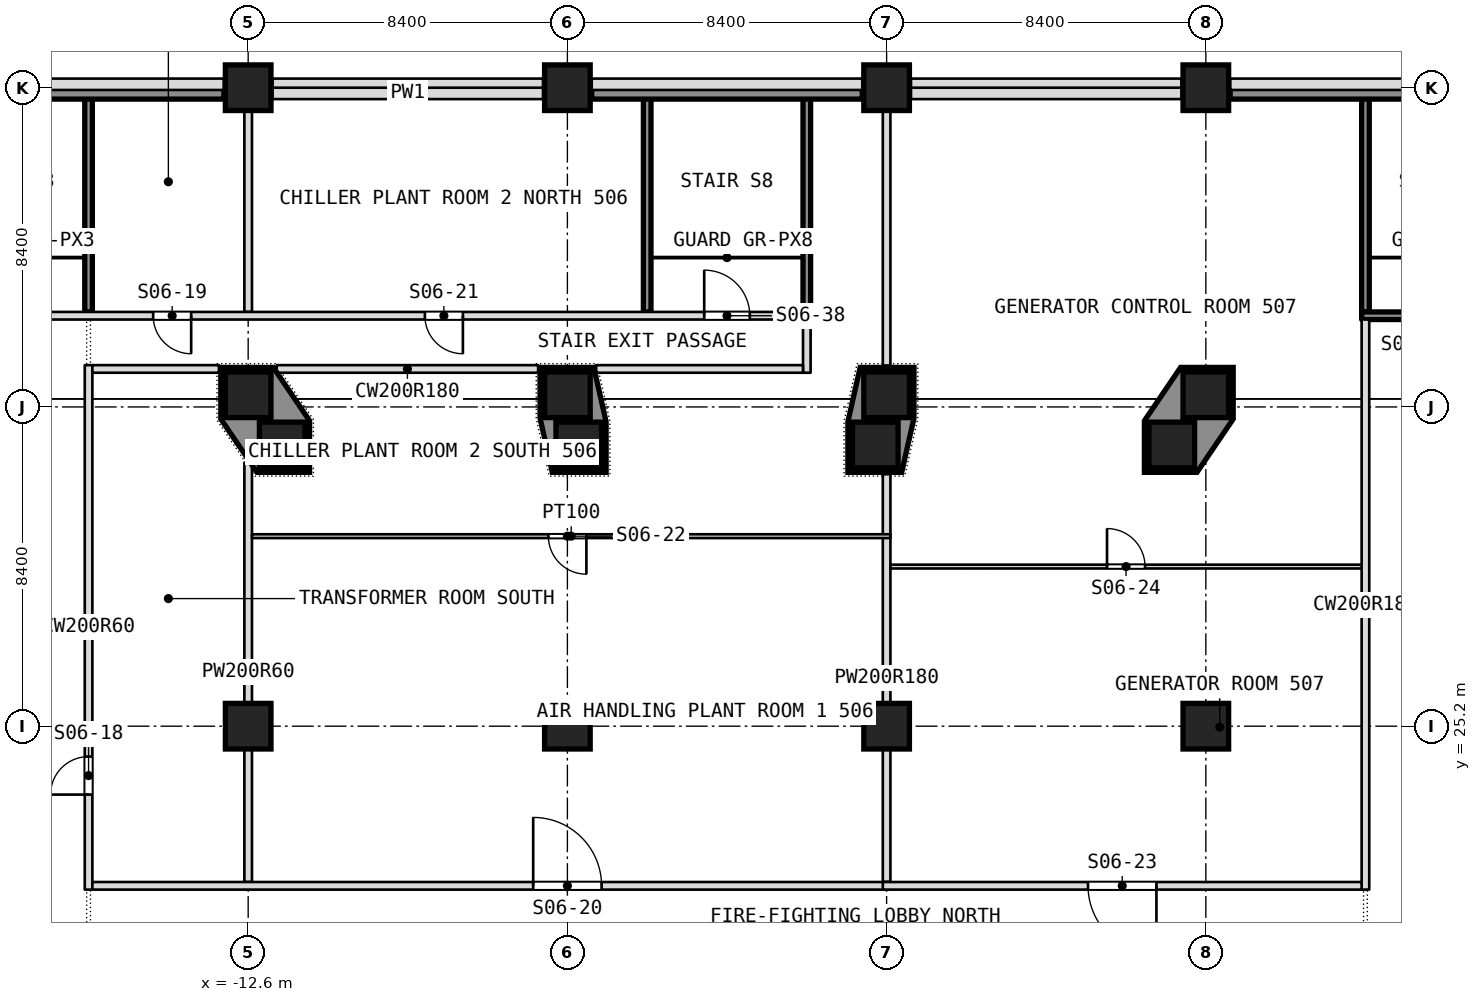
"""IFC4 building model, lengths in metres.
Left out: names, types, materials, properties, quantities, classifications, styles, units other than length and angle.
Written with IfcOpenShell. Run it as: python <this file> out.ifc"""

import sys

from ifc_helpers import new_model, si_unit, direction, frame, frame_2d, origin, origin_2d, place, context, subcontext, project, spatial, polyline, rectangle, outline, extrude, element, fill, save


model = new_model("IFC4")
c1 = context("Model", 3, precision=1e-05, world=origin(), true_north=direction((0.0, 1.0)))
c2 = subcontext(c1, "Body", "Model", "MODEL_VIEW")
j1 = project(units=[si_unit("LENGTHUNIT", "METRE"), si_unit("PLANEANGLEUNIT", "RADIAN")], contexts=[c1])
p1 = place(None, origin())
s1 = spatial("IfcSite", under=j1, at=p1, CompositionType="ELEMENT")
p2 = place(p1, origin())
s2 = spatial("IfcBuilding", under=s1, at=p2, CompositionType="ELEMENT")
p3 = place(p2, frame((0.0, 0.0, 31.0)))
s3 = spatial("IfcBuildingStorey", under=s2, at=p3, CompositionType="ELEMENT", Elevation=31.0)
for number, where, z_axis, x_axis in (
    (1, (-12.6, 25.2, 0.0), (0.0, 0.0, 1.0), (1.0, 0.0, 0.0)),
    (2, (-4.2, 25.2, 0.0), (0.0, 0.0, 1.0), (1.0, 0.0, 0.0)),
    (3, (4.2, 25.2, 0.0), (0.0, 0.0, 1.0), (1.0, 0.0, 0.0)),
    (4, (12.6, 25.2, 0.0), (0.0, 0.0, 1.0), (1.0, 0.0, 0.0)),
    (5, (-12.6, 33.92, 0.0), (0.0, 0.0, 1.0), (1.0, 0.0, 0.0)),
    (6, (-4.2, 33.92, 0.0), (0.0, 0.0, 1.0), (1.0, 0.0, 0.0)),
    (7, (4.2, 33.92, 0.0), (0.0, 0.0, 1.0), (1.0, 0.0, 0.0)),
    (8, (12.6, 33.92, 0.0), (0.0, 0.0, 1.0), (1.0, 0.0, 0.0)),
    (9, (-12.6, 42.0, 0.0), (0.0, 0.0, 1.0), (1.0, 0.0, 0.0)),
    (10, (-4.2, 42.0, 0.0), (0.0, 0.0, 1.0), (1.0, 0.0, 0.0)),
    (11, (4.2, 42.0, 0.0), (0.0, 0.0, 1.0), (1.0, 0.0, 0.0)),
    (12, (12.6, 42.0, 0.0), (0.0, 0.0, 1.0), (1.0, 0.0, 0.0)),
    (13, (-11.704, 32.6, 0.0), (0.0, 0.0, 1.0), (1.0, 0.0, 0.0)),
    (14, (-3.901, 32.6, 0.0), (0.0, 0.0, 1.0), (1.0, 0.0, 0.0)),
    (15, (3.901, 32.6, 0.0), (0.0, 0.0, 1.0), (1.0, 0.0, 0.0)),
    (16, (11.704, 32.6, 0.0), (0.0, 0.0, 1.0), (1.0, 0.0, 0.0)),
):
    element("IfcColumn", number, at=place(p3, frame(where, z_axis=z_axis, x_axis=x_axis)), inside=s3, PredefinedType="COLUMN", context=c2, shape_type="SweptSolid", body=[
        extrude(rectangle(XDim=1.2, YDim=1.2, at=origin_2d()), origin(), (0.0, 0.0, 1.0), 5.5),
    ])
p4 = place(p3, frame((16.8, 20.9, 0.0), z_axis=(0.0, 0.0, 1.0), x_axis=(0.0, 1.0, 0.0)))
e17 = element("IfcWall", 17, at=p4, inside=s3, PredefinedType="PARTITIONING", context=c2, shape_type="SweptSolid", body=[
    extrude(rectangle(XDim=15.0, YDim=0.2, at=frame_2d((7.5, 0.0))), origin(), (0.0, 0.0, 1.0), 4.95),
])
p5 = place(p3, frame((16.8, 36.1, 0.0), z_axis=(0.0, 0.0, 1.0), x_axis=(0.0, 1.0, 0.0)))
e18 = element("IfcWall", 18, at=p5, inside=s3, PredefinedType="PARTITIONING", context=c2, shape_type="SweptSolid", body=[
    extrude(rectangle(XDim=5.84, YDim=0.2, at=frame_2d((2.92, 0.0))), origin(), (0.0, 0.0, 1.0), 5.35),
])
p6 = place(p3, frame((4.2, 21.1, 0.0), z_axis=(0.0, 0.0, 1.0), x_axis=(0.0, 1.0, 0.0)))
e19 = element("IfcWall", 19, at=p6, inside=s3, PredefinedType="PARTITIONING", context=c2, shape_type="SweptSolid", body=[
    extrude(rectangle(XDim=10.73, YDim=0.2, at=frame_2d((5.365, 0.0))), origin(), (0.0, 0.0, 1.0), 4.95),
])
p7 = place(p3, frame((4.2, 34.69, 0.0), z_axis=(0.0, 0.0, 1.0), x_axis=(0.0, 1.0, 0.0)))
e20 = element("IfcWall", 20, at=p7, inside=s3, PredefinedType="PARTITIONING", context=c2, shape_type="SweptSolid", body=[
    extrude(rectangle(XDim=7.61, YDim=0.2, at=frame_2d((3.805, 0.0))), origin(), (0.0, 0.0, 1.0), 5.35),
])
p8 = place(p3, frame((2.1, 36.1, 0.0), z_axis=(0.0, 0.0, 1.0), x_axis=(0.0, 1.0, 0.0)))
e21 = element("IfcWall", 21, at=p8, inside=s3, PredefinedType="PARTITIONING", context=c2, shape_type="SweptSolid", body=[
    extrude(rectangle(XDim=5.84, YDim=0.2, at=frame_2d((2.92, 0.0))), origin(), (0.0, 0.0, 1.0), 5.35),
])
p9 = place(p3, frame((2.1, 34.5, 0.0), z_axis=(0.0, 0.0, 1.0), x_axis=(0.0, 1.0, 0.0)))
e22 = element("IfcWall", 22, at=p9, inside=s3, PredefinedType="PARTITIONING", context=c2, shape_type="SweptSolid", body=[
    extrude(rectangle(XDim=1.4, YDim=0.2, at=frame_2d((0.7, 0.0))), origin(), (0.0, 0.0, 1.0), 5.35),
])
p10 = place(p3, frame((-2.1, 36.1, 0.0), z_axis=(0.0, 0.0, 1.0), x_axis=(0.0, 1.0, 0.0)))
e23 = element("IfcWall", 23, at=p10, inside=s3, PredefinedType="PARTITIONING", context=c2, shape_type="SweptSolid", body=[
    extrude(rectangle(XDim=5.84, YDim=0.2, at=frame_2d((2.92, 0.0))), origin(), (0.0, 0.0, 1.0), 5.35),
])
p11 = place(p3, frame((-12.6, 21.1, 0.0), z_axis=(0.0, 0.0, 1.0), x_axis=(0.0, 1.0, 0.0)))
e24 = element("IfcWall", 24, at=p11, inside=s3, PredefinedType="PARTITIONING", context=c2, shape_type="SweptSolid", body=[
    extrude(rectangle(XDim=11.033, YDim=0.2, at=frame_2d((5.517, 0.0))), origin(), (0.0, 0.0, 1.0), 4.95),
])
p12 = place(p3, frame((-12.6, 36.1, 0.0), z_axis=(0.0, 0.0, 1.0), x_axis=(0.0, 1.0, 0.0)))
e25 = element("IfcWall", 25, at=p12, inside=s3, PredefinedType="PARTITIONING", context=c2, shape_type="SweptSolid", body=[
    extrude(rectangle(XDim=6.2, YDim=0.2, at=frame_2d((3.1, 0.0))), origin(), (0.0, 0.0, 1.0), 5.35),
])
p13 = place(p3, frame((-16.8, 20.9, 0.0), z_axis=(0.0, 0.0, 1.0), x_axis=(0.0, 1.0, 0.0)))
e26 = element("IfcWall", 26, at=p13, inside=s3, PredefinedType="PARTITIONING", context=c2, shape_type="SweptSolid", body=[
    extrude(rectangle(XDim=13.8, YDim=0.2, at=frame_2d((6.9, 0.0))), origin(), (0.0, 0.0, 1.0), 4.95),
])
p14 = place(p13, frame((2.5, 0.0, 0.0)))
e27 = element("IfcOpeningElement", 27, at=p14, cuts=e26, PredefinedType="OPENING", context=c2, shape_type="SweptSolid", body=[
    extrude(rectangle(XDim=1.0, YDim=2.1, at=frame_2d((0.5, 1.05))), frame((0.0, 0.1, 0.0), z_axis=(0.0, -1.0, 0.0), x_axis=(1.0, 0.0, 0.0)), (0.0, 0.0, 1.0), 0.2),
])
p15 = place(p3, frame((-16.8, 36.1, 0.0), z_axis=(0.0, 0.0, 1.0), x_axis=(0.0, 1.0, 0.0)))
e28 = element("IfcWall", 28, at=p15, inside=s3, PredefinedType="PARTITIONING", context=c2, shape_type="SweptSolid", body=[
    extrude(rectangle(XDim=5.84, YDim=0.2, at=frame_2d((2.92, 0.0))), origin(), (0.0, 0.0, 1.0), 5.35),
])
p16 = place(p3, frame((-16.7, 21.0, 0.0), z_axis=(0.0, 0.0, 1.0), x_axis=(1.0, 0.0, 0.0)))
e29 = element("IfcWall", 29, at=p16, inside=s3, PredefinedType="PARTITIONING", context=c2, shape_type="SweptSolid", body=[
    extrude(rectangle(XDim=21.0, YDim=0.2, at=frame_2d((10.5, 0.0))), origin(), (0.0, 0.0, 1.0), 5.35),
])
p17 = place(p16, frame((11.6, 0.0, 0.0)))
e30 = element("IfcOpeningElement", 30, at=p17, cuts=e29, PredefinedType="OPENING", context=c2, shape_type="SweptSolid", body=[
    extrude(rectangle(XDim=1.8, YDim=2.1, at=frame_2d((0.9, 1.05))), frame((0.0, 0.1, 0.0), z_axis=(0.0, -1.0, 0.0), x_axis=(1.0, 0.0, 0.0)), (0.0, 0.0, 1.0), 0.2),
])
p18 = place(p3, frame((4.1, 21.0, 0.0), z_axis=(0.0, 0.0, 1.0), x_axis=(1.0, 0.0, 0.0)))
e31 = element("IfcWall", 31, at=p18, inside=s3, PredefinedType="PARTITIONING", context=c2, shape_type="SweptSolid", body=[
    extrude(rectangle(XDim=12.6, YDim=0.2, at=frame_2d((6.3, 0.0))), origin(), (0.0, 0.0, 1.0), 5.35),
])
p19 = place(p18, frame((5.4, 0.0, 0.0)))
e32 = element("IfcOpeningElement", 32, at=p19, cuts=e31, PredefinedType="OPENING", context=c2, shape_type="SweptSolid", body=[
    extrude(rectangle(XDim=1.8, YDim=2.1, at=frame_2d((0.9, 1.05))), frame((0.0, 0.1, 0.0), z_axis=(0.0, -1.0, 0.0), x_axis=(1.0, 0.0, 0.0)), (0.0, 0.0, 1.0), 0.2),
])
p20 = place(p3, frame((4.3, 29.4, 0.0), z_axis=(0.0, 0.0, 1.0), x_axis=(1.0, 0.0, 0.0)))
e33 = element("IfcWall", 33, at=p20, inside=s3, PredefinedType="PARTITIONING", context=c2, shape_type="SweptSolid", body=[
    extrude(rectangle(XDim=12.4, YDim=0.1, at=frame_2d((6.2, 0.0))), origin(), (0.0, 0.0, 1.0), 5.35),
])
p21 = place(p20, frame((5.7, 0.0, 0.0)))
e34 = element("IfcOpeningElement", 34, at=p21, cuts=e33, PredefinedType="OPENING", context=c2, shape_type="SweptSolid", body=[
    extrude(rectangle(XDim=1.0, YDim=2.1, at=frame_2d((0.5, 1.05))), frame((0.0, 0.05, 0.0), z_axis=(0.0, -1.0, 0.0), x_axis=(1.0, 0.0, 0.0)), (0.0, 0.0, 1.0), 0.1),
])
p22 = place(p3, frame((-12.5, 30.2, 0.0), z_axis=(0.0, 0.0, 1.0), x_axis=(1.0, 0.0, 0.0)))
e35 = element("IfcWall", 35, at=p22, inside=s3, PredefinedType="PARTITIONING", context=c2, shape_type="SweptSolid", body=[
    extrude(rectangle(XDim=16.8, YDim=0.1, at=frame_2d((8.4, 0.0))), origin(), (0.0, 0.0, 1.0), 5.35),
])
p23 = place(p22, frame((7.8, 0.0, 0.0)))
e36 = element("IfcOpeningElement", 36, at=p23, cuts=e35, PredefinedType="OPENING", context=c2, shape_type="SweptSolid", body=[
    extrude(rectangle(XDim=1.0, YDim=2.1, at=frame_2d((0.5, 1.05))), frame((0.0, 0.05, 0.0), z_axis=(0.0, -1.0, 0.0), x_axis=(1.0, 0.0, 0.0)), (0.0, 0.0, 1.0), 0.1),
])
p24 = place(p3, frame((-16.7, 34.6, 0.0), z_axis=(0.0, 0.0, 1.0), x_axis=(1.0, 0.0, 0.0)))
e37 = element("IfcWall", 37, at=p24, inside=s3, PredefinedType="PARTITIONING", context=c2, shape_type="SweptSolid", body=[
    extrude(rectangle(XDim=3.33, YDim=0.2, at=frame_2d((1.665, 0.0))), origin(), (0.0, 0.0, 1.0), 5.35),
])
p25 = place(p3, frame((-11.849, 34.6, 0.0), z_axis=(0.0, 0.0, 1.0), x_axis=(1.0, 0.0, 0.0)))
e38 = element("IfcWall", 38, at=p25, inside=s3, PredefinedType="PARTITIONING", context=c2, shape_type="SweptSolid", body=[
    extrude(rectangle(XDim=6.879, YDim=0.2, at=frame_2d((3.439, 0.0))), origin(), (0.0, 0.0, 1.0), 5.35),
])
p26 = place(p3, frame((-3.444, 34.6, 0.0), z_axis=(0.0, 0.0, 1.0), x_axis=(1.0, 0.0, 0.0)))
e39 = element("IfcWall", 39, at=p26, inside=s3, PredefinedType="PARTITIONING", context=c2, shape_type="SweptSolid", body=[
    extrude(rectangle(XDim=5.444, YDim=0.2, at=frame_2d((2.722, 0.0))), origin(), (0.0, 0.0, 1.0), 5.35),
])
p27 = place(p3, frame((-21.1, 36.0, 0.0), z_axis=(0.0, 0.0, 1.0), x_axis=(1.0, 0.0, 0.0)))
e40 = element("IfcWall", 40, at=p27, inside=s3, PredefinedType="PARTITIONING", context=c2, shape_type="SweptSolid", body=[
    extrude(rectangle(XDim=23.3, YDim=0.2, at=frame_2d((11.65, 0.0))), origin(), (0.0, 0.0, 1.0), 5.35),
])
p28 = place(p27, frame((1.6, 0.0, 0.0)))
e41 = element("IfcOpeningElement", 41, at=p28, cuts=e40, PredefinedType="OPENING", context=c2, shape_type="SweptSolid", body=[
    extrude(rectangle(XDim=1.2, YDim=2.1, at=frame_2d((0.6, 1.05))), frame((0.0, 0.1, 0.0), z_axis=(0.0, -1.0, 0.0), x_axis=(1.0, 0.0, 0.0)), (0.0, 0.0, 1.0), 0.2),
])
p29 = place(p27, frame((6.0, 0.0, 0.0)))
e42 = element("IfcOpeningElement", 42, at=p29, cuts=e40, PredefinedType="OPENING", context=c2, shape_type="SweptSolid", body=[
    extrude(rectangle(XDim=1.0, YDim=2.1, at=frame_2d((0.5, 1.05))), frame((0.0, 0.1, 0.0), z_axis=(0.0, -1.0, 0.0), x_axis=(1.0, 0.0, 0.0)), (0.0, 0.0, 1.0), 0.2),
])
p30 = place(p27, frame((13.15, 0.0, 0.0)))
e43 = element("IfcOpeningElement", 43, at=p30, cuts=e40, PredefinedType="OPENING", context=c2, shape_type="SweptSolid", body=[
    extrude(rectangle(XDim=1.0, YDim=2.1, at=frame_2d((0.5, 1.05))), frame((0.0, 0.1, 0.0), z_axis=(0.0, -1.0, 0.0), x_axis=(1.0, 0.0, 0.0)), (0.0, 0.0, 1.0), 0.2),
])
p31 = place(p27, frame((20.5, 0.0, 0.0)))
e44 = element("IfcOpeningElement", 44, at=p31, cuts=e40, PredefinedType="OPENING", context=c2, shape_type="SweptSolid", body=[
    extrude(rectangle(XDim=1.2, YDim=2.1, at=frame_2d((0.6, 1.05))), frame((0.0, 0.1, 0.0), z_axis=(0.0, -1.0, 0.0), x_axis=(1.0, 0.0, 0.0)), (0.0, 0.0, 1.0), 0.2),
])
p32 = place(p3, frame((16.7, 36.0, 0.0), z_axis=(0.0, 0.0, 1.0), x_axis=(1.0, 0.0, 0.0)))
e45 = element("IfcWall", 45, at=p32, inside=s3, PredefinedType="PARTITIONING", context=c2, shape_type="SweptSolid", body=[
    extrude(rectangle(XDim=4.4, YDim=0.2, at=frame_2d((2.2, 0.0))), origin(), (0.0, 0.0, 1.0), 5.35),
])
p33 = place(p32, frame((1.6, 0.0, 0.0)))
e46 = element("IfcOpeningElement", 46, at=p33, cuts=e45, PredefinedType="OPENING", context=c2, shape_type="SweptSolid", body=[
    extrude(rectangle(XDim=1.2, YDim=2.1, at=frame_2d((0.6, 1.05))), frame((0.0, 0.1, 0.0), z_axis=(0.0, -1.0, 0.0), x_axis=(1.0, 0.0, 0.0)), (0.0, 0.0, 1.0), 0.2),
])
p34 = place(p3, frame((20.36, 42.09, 0.0), z_axis=(0.0, 0.0, 1.0), x_axis=(-1.0, 0.0, 0.0)))
e47 = element("IfcWall", 47, at=p34, inside=s3, PredefinedType="NOTDEFINED", context=c2, shape_type="SweptSolid", body=[
    extrude(rectangle(XDim=7.12, YDim=0.3, at=frame_2d((3.56, 0.0))), origin(), (0.0, 0.0, 1.0), 4.18),
])
p35 = place(p3, frame((11.96, 42.09, 0.0), z_axis=(0.0, 0.0, 1.0), x_axis=(-1.0, 0.0, 0.0)))
e48 = element("IfcWall", 48, at=p35, inside=s3, PredefinedType="NOTDEFINED", context=c2, shape_type="SweptSolid", body=[
    extrude(rectangle(XDim=7.12, YDim=0.3, at=frame_2d((3.56, 0.0))), origin(), (0.0, 0.0, 1.0), 4.18),
])
p36 = place(p3, frame((3.56, 42.09, 0.0), z_axis=(0.0, 0.0, 1.0), x_axis=(-1.0, 0.0, 0.0)))
e49 = element("IfcWall", 49, at=p36, inside=s3, PredefinedType="NOTDEFINED", context=c2, shape_type="SweptSolid", body=[
    extrude(rectangle(XDim=7.12, YDim=0.3, at=frame_2d((3.56, 0.0))), origin(), (0.0, 0.0, 1.0), 4.18),
])
p37 = place(p3, frame((-4.84, 42.09, 0.0), z_axis=(0.0, 0.0, 1.0), x_axis=(-1.0, 0.0, 0.0)))
e50 = element("IfcWall", 50, at=p37, inside=s3, PredefinedType="NOTDEFINED", context=c2, shape_type="SweptSolid", body=[
    extrude(rectangle(XDim=7.12, YDim=0.3, at=frame_2d((3.56, 0.0))), origin(), (0.0, 0.0, 1.0), 4.18),
])
p38 = place(p3, frame((-13.24, 42.09, 0.0), z_axis=(0.0, 0.0, 1.0), x_axis=(-1.0, 0.0, 0.0)))
e51 = element("IfcWall", 51, at=p38, inside=s3, PredefinedType="NOTDEFINED", context=c2, shape_type="SweptSolid", body=[
    extrude(rectangle(XDim=7.12, YDim=0.3, at=frame_2d((3.56, 0.0))), origin(), (0.0, 0.0, 1.0), 4.18),
])
p39 = place(p3, frame((-20.36, 41.85, 5.5), z_axis=(0.0, 0.0, 1.0), x_axis=(1.0, 0.0, 0.0)))
e52 = element("IfcWall", 52, at=p39, inside=s3, PredefinedType="PARAPET", context=c2, shape_type="SweptSolid", body=[
    extrude(rectangle(XDim=7.12, YDim=0.3, at=frame_2d((3.56, 0.0))), origin(), (0.0, 0.0, 1.0), 1.1),
])
p40 = place(p3, frame((-11.96, 41.85, 5.5), z_axis=(0.0, 0.0, 1.0), x_axis=(1.0, 0.0, 0.0)))
e53 = element("IfcWall", 53, at=p40, inside=s3, PredefinedType="PARAPET", context=c2, shape_type="SweptSolid", body=[
    extrude(rectangle(XDim=7.12, YDim=0.3, at=frame_2d((3.56, 0.0))), origin(), (0.0, 0.0, 1.0), 1.1),
])
p41 = place(p3, frame((-3.56, 41.85, 5.5), z_axis=(0.0, 0.0, 1.0), x_axis=(1.0, 0.0, 0.0)))
e54 = element("IfcWall", 54, at=p41, inside=s3, PredefinedType="PARAPET", context=c2, shape_type="SweptSolid", body=[
    extrude(rectangle(XDim=7.12, YDim=0.3, at=frame_2d((3.56, 0.0))), origin(), (0.0, 0.0, 1.0), 1.1),
])
p42 = place(p3, frame((4.84, 41.85, 5.5), z_axis=(0.0, 0.0, 1.0), x_axis=(1.0, 0.0, 0.0)))
e55 = element("IfcWall", 55, at=p42, inside=s3, PredefinedType="PARAPET", context=c2, shape_type="SweptSolid", body=[
    extrude(rectangle(XDim=7.12, YDim=0.3, at=frame_2d((3.56, 0.0))), origin(), (0.0, 0.0, 1.0), 1.1),
])
p43 = place(p3, frame((13.24, 41.85, 5.5), z_axis=(0.0, 0.0, 1.0), x_axis=(1.0, 0.0, 0.0)))
e56 = element("IfcWall", 56, at=p43, inside=s3, PredefinedType="PARAPET", context=c2, shape_type="SweptSolid", body=[
    extrude(rectangle(XDim=7.12, YDim=0.3, at=frame_2d((3.56, 0.0))), origin(), (0.0, 0.0, 1.0), 1.1),
])
p44 = place(p3, origin())
e57 = element("IfcWall", 57, at=p44, inside=s3, PredefinedType="SOLIDWALL", context=c2, shape_type="SweptSolid", body=[
    extrude(outline(polyline([(-13.32, 34.64), (-11.937, 34.64), (-10.984, 33.237), (-10.984, 31.88), (-12.368, 31.88), (-13.32, 33.283), (-13.32, 34.64)]), holes=[polyline([(-11.104, 32.0), (-11.104, 33.2), (-12.304, 33.2), (-12.304, 32.0), (-11.104, 32.0)]), polyline([(-12.0, 33.32), (-12.0, 34.52), (-13.2, 34.52), (-13.2, 33.32), (-12.0, 33.32)])]), origin(), (0.0, 0.0, 1.0), 5.5),
])
p45 = place(p3, origin())
e58 = element("IfcWall", 58, at=p45, inside=s3, PredefinedType="SOLIDWALL", context=c2, shape_type="SweptSolid", body=[
    extrude(outline(polyline([(-4.92, 34.64), (-3.504, 34.64), (-3.181, 33.213), (-3.181, 31.88), (-4.597, 31.88), (-4.92, 33.307), (-4.92, 34.64)]), holes=[polyline([(-3.302, 32.0), (-3.302, 33.2), (-4.501, 33.2), (-4.501, 32.0), (-3.302, 32.0)]), polyline([(-3.6, 33.32), (-3.6, 34.52), (-4.8, 34.52), (-4.8, 33.32), (-3.6, 33.32)])]), origin(), (0.0, 0.0, 1.0), 5.5),
])
p46 = place(p3, origin())
e59 = element("IfcWall", 59, at=p46, inside=s3, PredefinedType="SOLIDWALL", context=c2, shape_type="SweptSolid", body=[
    extrude(outline(polyline([(3.181, 33.213), (3.504, 34.64), (4.92, 34.64), (4.92, 33.307), (4.597, 31.88), (3.181, 31.88), (3.181, 33.213)]), holes=[polyline([(3.6, 33.32), (4.8, 33.32), (4.8, 34.52), (3.6, 34.52), (3.6, 33.32)]), polyline([(3.302, 32.0), (4.501, 32.0), (4.501, 33.2), (3.302, 33.2), (3.302, 32.0)])]), origin(), (0.0, 0.0, 1.0), 5.5),
])
p47 = place(p3, origin())
e60 = element("IfcWall", 60, at=p47, inside=s3, PredefinedType="SOLIDWALL", context=c2, shape_type="SweptSolid", body=[
    extrude(outline(polyline([(11.937, 34.64), (13.32, 34.64), (13.32, 33.283), (12.368, 31.88), (10.984, 31.88), (10.984, 33.237), (11.937, 34.64)]), holes=[polyline([(13.2, 33.32), (13.2, 34.52), (12.0, 34.52), (12.0, 33.32), (13.2, 33.32)]), polyline([(12.304, 32.0), (12.304, 33.2), (11.104, 33.2), (11.104, 32.0), (12.304, 32.0)])]), origin(), (0.0, 0.0, 1.0), 5.5),
])
p48 = place(p14, origin())
e61 = element("IfcDoor", 61, at=p48, inside=s3, OperationType="SINGLE_SWING_LEFT", PredefinedType="DOOR", context=c2, shape_type="SweptSolid", body=[
    extrude(rectangle(XDim=1.0, YDim=2.1, at=frame_2d((0.5, 1.05))), frame((0.0, 0.025, 0.0), z_axis=(0.0, -1.0, 0.0), x_axis=(1.0, 0.0, 0.0)), (0.0, 0.0, 1.0), 0.05),
])
fill(e27, e61)
p49 = place(p29, origin())
e62 = element("IfcDoor", 62, at=p49, inside=s3, OperationType="SINGLE_SWING_LEFT", PredefinedType="DOOR", context=c2, shape_type="SweptSolid", body=[
    extrude(rectangle(XDim=1.0, YDim=2.1, at=frame_2d((0.5, 1.05))), frame((0.0, 0.025, 0.0), z_axis=(0.0, -1.0, 0.0), x_axis=(1.0, 0.0, 0.0)), (0.0, 0.0, 1.0), 0.05),
])
fill(e42, e62)
p50 = place(p17, origin())
e63 = element("IfcDoor", 63, at=p50, inside=s3, OperationType="DOUBLE_DOOR_SINGLE_SWING", PredefinedType="DOOR", context=c2, shape_type="SweptSolid", body=[
    extrude(rectangle(XDim=1.8, YDim=2.1, at=frame_2d((0.9, 1.05))), frame((0.0, 0.025, 0.0), z_axis=(0.0, -1.0, 0.0), x_axis=(1.0, 0.0, 0.0)), (0.0, 0.0, 1.0), 0.05),
])
fill(e30, e63)
p51 = place(p30, origin())
e64 = element("IfcDoor", 64, at=p51, inside=s3, OperationType="SINGLE_SWING_RIGHT", PredefinedType="DOOR", context=c2, shape_type="SweptSolid", body=[
    extrude(rectangle(XDim=1.0, YDim=2.1, at=frame_2d((0.5, 1.05))), frame((0.0, 0.025, 0.0), z_axis=(0.0, -1.0, 0.0), x_axis=(1.0, 0.0, 0.0)), (0.0, 0.0, 1.0), 0.05),
])
fill(e43, e64)
p52 = place(p23, origin())
e65 = element("IfcDoor", 65, at=p52, inside=s3, OperationType="SINGLE_SWING_LEFT", PredefinedType="DOOR", context=c2, shape_type="SweptSolid", body=[
    extrude(rectangle(XDim=1.0, YDim=2.1, at=frame_2d((0.5, 1.05))), frame((0.0, 0.025, 0.0), z_axis=(0.0, -1.0, 0.0), x_axis=(1.0, 0.0, 0.0)), (0.0, 0.0, 1.0), 0.05),
])
fill(e36, e65)
p53 = place(p19, origin())
e66 = element("IfcDoor", 66, at=p53, inside=s3, OperationType="DOUBLE_DOOR_SINGLE_SWING", PredefinedType="DOOR", context=c2, shape_type="SweptSolid", body=[
    extrude(rectangle(XDim=1.8, YDim=2.1, at=frame_2d((0.9, 1.05))), frame((0.0, 0.025, 0.0), z_axis=(0.0, -1.0, 0.0), x_axis=(1.0, 0.0, 0.0)), (0.0, 0.0, 1.0), 0.05),
])
fill(e32, e66)
p54 = place(p21, origin())
e67 = element("IfcDoor", 67, at=p54, inside=s3, OperationType="SINGLE_SWING_RIGHT", PredefinedType="DOOR", context=c2, shape_type="SweptSolid", body=[
    extrude(rectangle(XDim=1.0, YDim=2.1, at=frame_2d((0.5, 1.05))), frame((0.0, 0.025, 0.0), z_axis=(0.0, -1.0, 0.0), x_axis=(1.0, 0.0, 0.0)), (0.0, 0.0, 1.0), 0.05),
])
fill(e34, e67)
p55 = place(p31, origin())
e68 = element("IfcDoor", 68, at=p55, inside=s3, OperationType="SINGLE_SWING_RIGHT", PredefinedType="DOOR", context=c2, shape_type="SweptSolid", body=[
    extrude(rectangle(XDim=1.2, YDim=2.1, at=frame_2d((0.6, 1.05))), frame((0.0, 0.025, 0.0), z_axis=(0.0, -1.0, 0.0), x_axis=(1.0, 0.0, 0.0)), (0.0, 0.0, 1.0), 0.05),
])
fill(e44, e68)
save(model, sys.argv[1])
